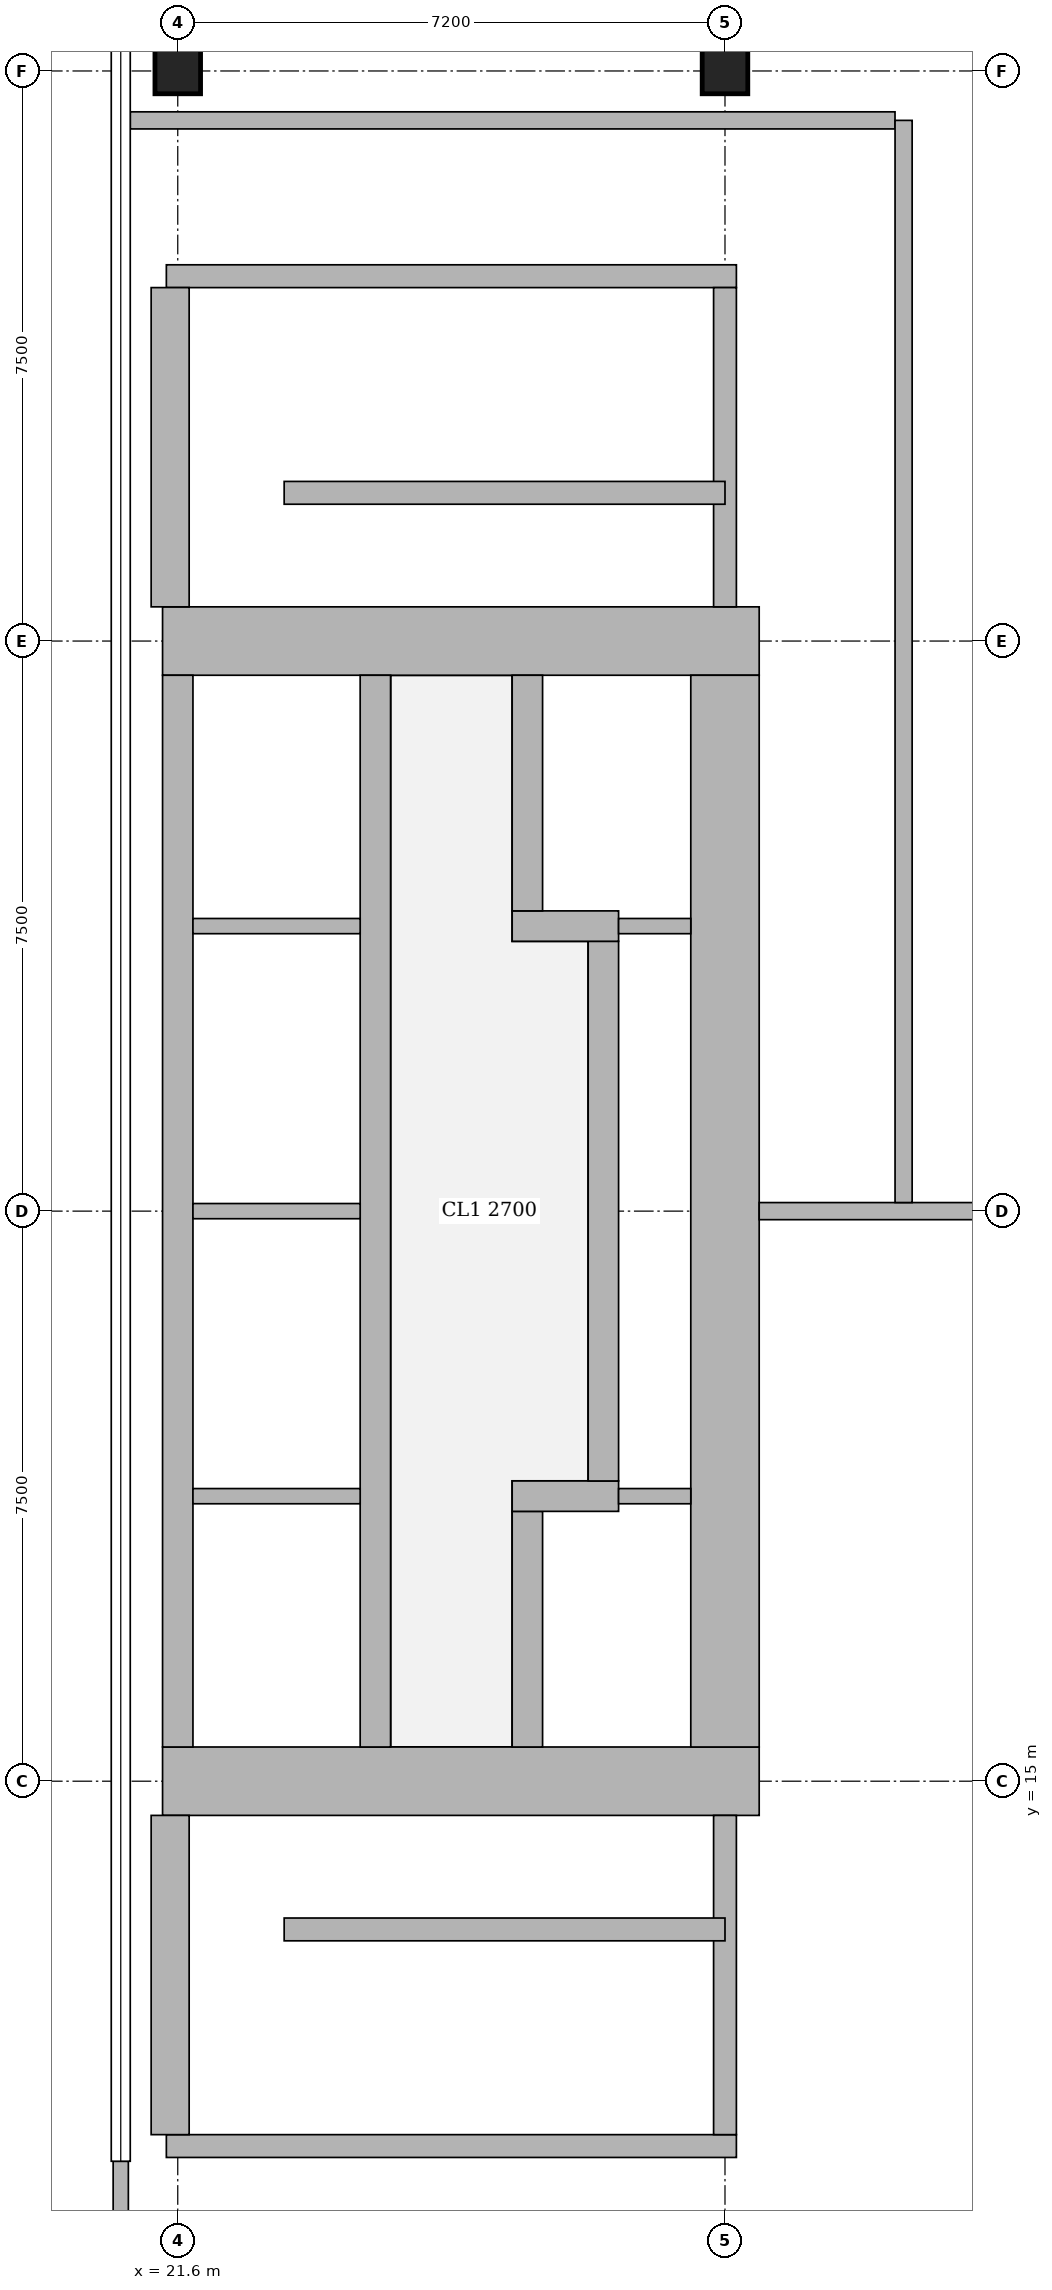
"""IFC4 building model, lengths in metres.
Left out: names, types, materials, properties, quantities, classifications, styles, units other than length and angle.
Written with IfcOpenShell. Run it as: python <this file> out.ifc"""

import sys

from ifc_helpers import new_model, si_unit, direction, frame, frame_2d, origin, origin_2d, place, context, subcontext, project, spatial, rectangle, extrude, element, fill, save


model = new_model("IFC4")
c1 = context("Model", 3, precision=1e-05, world=origin(), true_north=direction((0.0, 1.0)))
c2 = subcontext(c1, "Body", "Model", "MODEL_VIEW")
j1 = project(units=[si_unit("LENGTHUNIT", "METRE"), si_unit("PLANEANGLEUNIT", "RADIAN")], contexts=[c1])
p1 = place(None, origin())
s1 = spatial("IfcSite", under=j1, at=p1, CompositionType="ELEMENT")
p2 = place(p1, origin())
s2 = spatial("IfcBuilding", under=s1, at=p2, CompositionType="ELEMENT")
p3 = place(p2, frame((0.0, 0.0, 296.6)))
s3 = spatial("IfcBuildingStorey", under=s2, at=p3, CompositionType="ELEMENT", Elevation=296.6)
for number, where, z_axis, x_axis in (
    (1, (21.6, 37.5, 0.0), (0.0, 0.0, 1.0), (1.0, 0.0, 0.0)),
    (2, (28.8, 37.5, 0.0), (0.0, 0.0, 1.0), (1.0, 0.0, 0.0)),
):
    element("IfcColumn", number, at=place(p3, frame(where, z_axis=z_axis, x_axis=x_axis)), inside=s3, PredefinedType="COLUMN", context=c2, shape_type="SweptSolid", body=[
        extrude(rectangle(XDim=0.6, YDim=0.6, at=origin_2d()), origin(), (0.0, 0.0, 1.0), 5.0),
    ])
p4 = place(p3, frame((21.4, 15.0, 0.0), z_axis=(0.0, 0.0, 1.0), x_axis=(1.0, 0.0, 0.0)))
e3 = element("IfcWall", 3, at=p4, inside=s3, PredefinedType="SHEAR", context=c2, shape_type="SweptSolid", body=[
    extrude(rectangle(XDim=7.85, YDim=0.9, at=frame_2d((3.925, 0.0))), origin(), (0.0, 0.0, 1.0), 5.0),
])
p5 = place(p4, frame((3.25, 0.0, 0.0)))
e4 = element("IfcOpeningElement", 4, at=p5, cuts=e3, PredefinedType="OPENING", context=c2, shape_type="SweptSolid", body=[
    extrude(rectangle(XDim=1.1, YDim=2.1, at=frame_2d((0.55, 1.05))), frame((0.0, 0.46, 0.0), z_axis=(0.0, -1.0, 0.0), x_axis=(1.0, 0.0, 0.0)), (0.0, 0.0, 1.0), 0.92),
])
p6 = place(p3, frame((21.4, 30.0, 0.0), z_axis=(0.0, 0.0, 1.0), x_axis=(1.0, 0.0, 0.0)))
e5 = element("IfcWall", 5, at=p6, inside=s3, PredefinedType="SHEAR", context=c2, shape_type="SweptSolid", body=[
    extrude(rectangle(XDim=7.85, YDim=0.9, at=frame_2d((3.925, 0.0))), origin(), (0.0, 0.0, 1.0), 5.0),
])
p7 = place(p6, frame((3.25, 0.0, 0.0)))
e6 = element("IfcOpeningElement", 6, at=p7, cuts=e5, PredefinedType="OPENING", context=c2, shape_type="SweptSolid", body=[
    extrude(rectangle(XDim=1.1, YDim=2.1, at=frame_2d((0.55, 1.05))), frame((0.0, 0.46, 0.0), z_axis=(0.0, -1.0, 0.0), x_axis=(1.0, 0.0, 0.0)), (0.0, 0.0, 1.0), 0.92),
])
p8 = place(p3, frame((28.8, 15.45, 0.0), z_axis=(0.0, 0.0, 1.0), x_axis=(0.0, 1.0, 0.0)))
e7 = element("IfcWall", 7, at=p8, inside=s3, PredefinedType="SHEAR", context=c2, shape_type="SweptSolid", body=[
    extrude(rectangle(XDim=14.1, YDim=0.9, at=frame_2d((7.05, 0.0))), origin(), (0.0, 0.0, 1.0), 5.0),
])
for number, where, z_axis, x_axis in (
    (8, (21.6, 15.45, 0.0), (0.0, 0.0, 1.0), (0.0, 1.0, 0.0)),
    (9, (24.2, 15.45, 0.0), (0.0, 0.0, 1.0), (0.0, 1.0, 0.0)),
):
    element("IfcWall", number, at=place(p3, frame(where, z_axis=z_axis, x_axis=x_axis)), inside=s3, PredefinedType="SHEAR", context=c2, shape_type="SweptSolid", body=[
        extrude(rectangle(XDim=14.1, YDim=0.4, at=frame_2d((7.05, 0.0))), origin(), (0.0, 0.0, 1.0), 5.0),
    ])
p9 = place(p3, frame((26.2, 15.45, 0.0), z_axis=(0.0, 0.0, 1.0), x_axis=(0.0, 1.0, 0.0)))
e10 = element("IfcWall", 10, at=p9, inside=s3, PredefinedType="SHEAR", context=c2, shape_type="SweptSolid", body=[
    extrude(rectangle(XDim=3.1, YDim=0.4, at=frame_2d((1.55, 0.0))), origin(), (0.0, 0.0, 1.0), 5.0),
])
p10 = place(p9, frame((0.825, 0.0, 0.0)))
e11 = element("IfcOpeningElement", 11, at=p10, cuts=e10, PredefinedType="OPENING", context=c2, shape_type="SweptSolid", body=[
    extrude(rectangle(XDim=1.2, YDim=2.1, at=frame_2d((0.6, 1.05))), frame((0.0, 0.21, 0.0), z_axis=(0.0, -1.0, 0.0), x_axis=(1.0, 0.0, 0.0)), (0.0, 0.0, 1.0), 0.42),
])
p11 = place(p3, frame((26.0, 18.75, 0.0), z_axis=(0.0, 0.0, 1.0), x_axis=(1.0, 0.0, 0.0)))
e12 = element("IfcWall", 12, at=p11, inside=s3, PredefinedType="SHEAR", context=c2, shape_type="SweptSolid", body=[
    extrude(rectangle(XDim=1.4, YDim=0.4, at=frame_2d((0.7, 0.0))), origin(), (0.0, 0.0, 1.0), 5.0),
])
p12 = place(p3, frame((27.2, 18.95, 0.0), z_axis=(0.0, 0.0, 1.0), x_axis=(0.0, 1.0, 0.0)))
e13 = element("IfcWall", 13, at=p12, inside=s3, PredefinedType="SHEAR", context=c2, shape_type="SweptSolid", body=[
    extrude(rectangle(XDim=7.1, YDim=0.4, at=frame_2d((3.55, 0.0))), origin(), (0.0, 0.0, 1.0), 5.0),
])
p13 = place(p3, frame((26.0, 26.25, 0.0), z_axis=(0.0, 0.0, 1.0), x_axis=(1.0, 0.0, 0.0)))
e14 = element("IfcWall", 14, at=p13, inside=s3, PredefinedType="SHEAR", context=c2, shape_type="SweptSolid", body=[
    extrude(rectangle(XDim=1.4, YDim=0.4, at=frame_2d((0.7, 0.0))), origin(), (0.0, 0.0, 1.0), 5.0),
])
p14 = place(p3, frame((26.2, 26.45, 0.0), z_axis=(0.0, 0.0, 1.0), x_axis=(0.0, 1.0, 0.0)))
e15 = element("IfcWall", 15, at=p14, inside=s3, PredefinedType="SHEAR", context=c2, shape_type="SweptSolid", body=[
    extrude(rectangle(XDim=3.1, YDim=0.4, at=frame_2d((1.55, 0.0))), origin(), (0.0, 0.0, 1.0), 5.0),
])
p15 = place(p14, frame((1.075, 0.0, 0.0)))
e16 = element("IfcOpeningElement", 16, at=p15, cuts=e15, PredefinedType="OPENING", context=c2, shape_type="SweptSolid", body=[
    extrude(rectangle(XDim=1.2, YDim=2.1, at=frame_2d((0.6, 1.05))), frame((0.0, 0.21, 0.0), z_axis=(0.0, -1.0, 0.0), x_axis=(1.0, 0.0, 0.0)), (0.0, 0.0, 1.0), 0.42),
])
p16 = place(p3, frame((21.45, 10.2, 0.0), z_axis=(0.0, 0.0, 1.0), x_axis=(1.0, 0.0, 0.0)))
e17 = element("IfcWall", 17, at=p16, inside=s3, PredefinedType="SHEAR", context=c2, shape_type="SweptSolid", body=[
    extrude(rectangle(XDim=7.5, YDim=0.3, at=frame_2d((3.75, 0.0))), origin(), (0.0, 0.0, 1.0), 5.0),
])
p17 = place(p16, frame((0.5, 0.0, 0.0)))
e18 = element("IfcOpeningElement", 18, at=p17, cuts=e17, PredefinedType="OPENING", context=c2, shape_type="SweptSolid", body=[
    extrude(rectangle(XDim=1.1, YDim=2.1, at=frame_2d((0.55, 1.05))), frame((0.0, 0.16, 0.0), z_axis=(0.0, -1.0, 0.0), x_axis=(1.0, 0.0, 0.0)), (0.0, 0.0, 1.0), 0.32),
])
p18 = place(p3, frame((21.5, 10.35, 0.0), z_axis=(0.0, 0.0, 1.0), x_axis=(0.0, 1.0, 0.0)))
e19 = element("IfcWall", 19, at=p18, inside=s3, PredefinedType="SHEAR", context=c2, shape_type="SweptSolid", body=[
    extrude(rectangle(XDim=4.2, YDim=0.5, at=frame_2d((2.1, 0.0))), origin(), (0.0, 0.0, 1.0), 5.0),
])
p19 = place(p3, frame((28.8, 10.35, 0.0), z_axis=(0.0, 0.0, 1.0), x_axis=(0.0, 1.0, 0.0)))
e20 = element("IfcWall", 20, at=p19, inside=s3, PredefinedType="SHEAR", context=c2, shape_type="SweptSolid", body=[
    extrude(rectangle(XDim=4.2, YDim=0.3, at=frame_2d((2.1, 0.0))), origin(), (0.0, 0.0, 1.0), 5.0),
])
p20 = place(p3, frame((21.45, 34.8, 0.0), z_axis=(0.0, 0.0, 1.0), x_axis=(1.0, 0.0, 0.0)))
e21 = element("IfcWall", 21, at=p20, inside=s3, PredefinedType="SHEAR", context=c2, shape_type="SweptSolid", body=[
    extrude(rectangle(XDim=7.5, YDim=0.3, at=frame_2d((3.75, 0.0))), origin(), (0.0, 0.0, 1.0), 5.0),
])
p21 = place(p20, frame((0.5, 0.0, 0.0)))
e22 = element("IfcOpeningElement", 22, at=p21, cuts=e21, PredefinedType="OPENING", context=c2, shape_type="SweptSolid", body=[
    extrude(rectangle(XDim=1.1, YDim=2.1, at=frame_2d((0.55, 1.05))), frame((0.0, 0.16, 0.0), z_axis=(0.0, -1.0, 0.0), x_axis=(1.0, 0.0, 0.0)), (0.0, 0.0, 1.0), 0.32),
])
p22 = place(p3, frame((21.5, 30.45, 0.0), z_axis=(0.0, 0.0, 1.0), x_axis=(0.0, 1.0, 0.0)))
e23 = element("IfcWall", 23, at=p22, inside=s3, PredefinedType="SHEAR", context=c2, shape_type="SweptSolid", body=[
    extrude(rectangle(XDim=4.2, YDim=0.5, at=frame_2d((2.1, 0.0))), origin(), (0.0, 0.0, 1.0), 5.0),
])
p23 = place(p3, frame((28.8, 30.45, 0.0), z_axis=(0.0, 0.0, 1.0), x_axis=(0.0, 1.0, 0.0)))
e24 = element("IfcWall", 24, at=p23, inside=s3, PredefinedType="SHEAR", context=c2, shape_type="SweptSolid", body=[
    extrude(rectangle(XDim=4.2, YDim=0.3, at=frame_2d((2.1, 0.0))), origin(), (0.0, 0.0, 1.0), 5.0),
])
p24 = place(p3, frame((20.85, 10.0, 0.0), z_axis=(0.0, 0.0, 1.0), x_axis=(0.0, -1.0, 0.0)))
e25 = element("IfcWall", 25, at=p24, inside=s3, PredefinedType="SOLIDWALL", context=c2, shape_type="SweptSolid", body=[
    extrude(rectangle(XDim=2.337, YDim=0.2, at=frame_2d((1.168, 0.0))), origin(), (0.0, 0.0, 1.0), 4.65),
])
p25 = place(p24, frame((0.5, 0.0, 0.0)))
e26 = element("IfcOpeningElement", 26, at=p25, cuts=e25, PredefinedType="OPENING", context=c2, shape_type="SweptSolid", body=[
    extrude(rectangle(XDim=1.0, YDim=2.4, at=frame_2d((0.5, 1.2))), frame((0.0, 0.11, 0.0), z_axis=(0.0, -1.0, 0.0), x_axis=(1.0, 0.0, 0.0)), (0.0, 0.0, 1.0), 0.22),
])
p26 = place(p3, frame((29.25, 22.5, 0.0), z_axis=(0.0, 0.0, 1.0), x_axis=(1.0, 0.0, 0.0)))
e27 = element("IfcWall", 27, at=p26, inside=s3, PredefinedType="SOLIDWALL", context=c2, shape_type="SweptSolid", body=[
    extrude(rectangle(XDim=3.449, YDim=0.225, at=frame_2d((1.725, 0.0))), origin(), (0.0, 0.0, 1.0), 4.65),
])
p27 = place(p26, origin())
e28 = element("IfcOpeningElement", 28, at=p27, cuts=e27, PredefinedType="OPENING", context=c2, shape_type="SweptSolid", body=[
    extrude(rectangle(XDim=1.8, YDim=2.4, at=frame_2d((0.9, 1.2))), frame((0.0, 0.123, 0.0), z_axis=(0.0, -1.0, 0.0), x_axis=(1.0, 0.0, 0.0)), (0.0, 0.0, 1.0), 0.245),
])
p28 = place(p3, frame((20.975, 36.85, 0.0), z_axis=(0.0, 0.0, 1.0), x_axis=(1.0, 0.0, 0.0)))
e29 = element("IfcWall", 29, at=p28, inside=s3, PredefinedType="SOLIDWALL", context=c2, shape_type="SweptSolid", body=[
    extrude(rectangle(XDim=10.062, YDim=0.225, at=frame_2d((5.031, 0.0))), origin(), (0.0, 0.0, 1.0), 4.65),
])
p29 = place(p28, frame((4.375, 0.0, 0.0)))
e30 = element("IfcOpeningElement", 30, at=p29, cuts=e29, PredefinedType="OPENING", context=c2, shape_type="SweptSolid", body=[
    extrude(rectangle(XDim=1.8, YDim=2.4, at=frame_2d((0.9, 1.2))), frame((0.0, 0.123, 0.0), z_axis=(0.0, -1.0, 0.0), x_axis=(1.0, 0.0, 0.0)), (0.0, 0.0, 1.0), 0.245),
])
p30 = place(p3, frame((31.15, 22.613, 0.0), z_axis=(0.0, 0.0, 1.0), x_axis=(0.0, 1.0, 0.0)))
e31 = element("IfcWall", 31, at=p30, inside=s3, PredefinedType="SOLIDWALL", context=c2, shape_type="SweptSolid", body=[
    extrude(rectangle(XDim=14.237, YDim=0.225, at=frame_2d((7.119, 0.0))), origin(), (0.0, 0.0, 1.0), 4.65),
])
p31 = place(p30, frame((3.987, 0.0, 0.0)))
e32 = element("IfcOpeningElement", 32, at=p31, cuts=e31, PredefinedType="OPENING", context=c2, shape_type="SweptSolid", body=[
    extrude(rectangle(XDim=1.8, YDim=2.4, at=frame_2d((0.9, 1.2))), frame((0.0, 0.123, 0.0), z_axis=(0.0, -1.0, 0.0), x_axis=(1.0, 0.0, 0.0)), (0.0, 0.0, 1.0), 0.245),
])
for number, where, z_axis, x_axis in (
    (33, (23.0, 13.05, 0.0), (0.0, 0.0, 1.0), (1.0, 0.0, 0.0)),
    (34, (23.0, 31.95, 0.0), (0.0, 0.0, 1.0), (1.0, 0.0, 0.0)),
):
    element("IfcWall", number, at=place(p3, frame(where, z_axis=z_axis, x_axis=x_axis)), inside=s3, PredefinedType="SHEAR", context=c2, shape_type="SweptSolid", body=[
        extrude(rectangle(XDim=5.8, YDim=0.3, at=frame_2d((2.9, 0.0))), origin(), (0.0, 0.0, 1.0), 5.0),
    ])
for number, where, z_axis, x_axis in (
    (35, (21.8, 18.75, 0.0), (0.0, 0.0, 1.0), (1.0, 0.0, 0.0)),
    (36, (21.8, 22.5, 0.0), (0.0, 0.0, 1.0), (1.0, 0.0, 0.0)),
    (37, (21.8, 26.25, 0.0), (0.0, 0.0, 1.0), (1.0, 0.0, 0.0)),
):
    element("IfcWall", number, at=place(p3, frame(where, z_axis=z_axis, x_axis=x_axis)), inside=s3, PredefinedType="SOLIDWALL", context=c2, shape_type="SweptSolid", body=[
        extrude(rectangle(XDim=2.2, YDim=0.2, at=frame_2d((1.1, 0.0))), origin(), (0.0, 0.0, 1.0), 4.65),
    ])
for number, where, z_axis, x_axis in (
    (38, (27.4, 18.75, 0.0), (0.0, 0.0, 1.0), (1.0, 0.0, 0.0)),
    (39, (27.4, 26.25, 0.0), (0.0, 0.0, 1.0), (1.0, 0.0, 0.0)),
):
    element("IfcWall", number, at=place(p3, frame(where, z_axis=z_axis, x_axis=x_axis)), inside=s3, PredefinedType="SOLIDWALL", context=c2, shape_type="SweptSolid", body=[
        extrude(rectangle(XDim=0.95, YDim=0.2, at=frame_2d((0.475, 0.0))), origin(), (0.0, 0.0, 1.0), 4.65),
    ])
p32 = place(p25, origin())
e40 = element("IfcDoor", 40, at=p32, inside=s3, OperationType="SINGLE_SWING_RIGHT", PredefinedType="DOOR", context=c2, shape_type="SweptSolid", body=[
    extrude(rectangle(XDim=1.0, YDim=2.4, at=frame_2d((0.5, 1.2))), frame((0.0, 0.025, 0.0), z_axis=(0.0, -1.0, 0.0), x_axis=(1.0, 0.0, 0.0)), (0.0, 0.0, 1.0), 0.05),
])
fill(e26, e40)
p33 = place(p27, origin())
e41 = element("IfcDoor", 41, at=p33, inside=s3, OperationType="DOUBLE_DOOR_SINGLE_SWING", PredefinedType="DOOR", context=c2, shape_type="SweptSolid", body=[
    extrude(rectangle(XDim=1.8, YDim=2.4, at=frame_2d((0.9, 1.2))), frame((0.0, 0.025, 0.0), z_axis=(0.0, -1.0, 0.0), x_axis=(1.0, 0.0, 0.0)), (0.0, 0.0, 1.0), 0.05),
])
fill(e28, e41)
p34 = place(p31, origin())
e42 = element("IfcDoor", 42, at=p34, inside=s3, OperationType="DOUBLE_DOOR_SINGLE_SWING", PredefinedType="DOOR", context=c2, shape_type="SweptSolid", body=[
    extrude(rectangle(XDim=1.8, YDim=2.4, at=frame_2d((0.9, 1.2))), frame((0.0, 0.025, 0.0), z_axis=(0.0, -1.0, 0.0), x_axis=(1.0, 0.0, 0.0)), (0.0, 0.0, 1.0), 0.05),
])
fill(e32, e42)
p35 = place(p29, origin())
e43 = element("IfcDoor", 43, at=p35, inside=s3, OperationType="DOUBLE_DOOR_SINGLE_SWING", PredefinedType="DOOR", context=c2, shape_type="SweptSolid", body=[
    extrude(rectangle(XDim=1.8, YDim=2.4, at=frame_2d((0.9, 1.2))), frame((0.0, 0.025, 0.0), z_axis=(0.0, -1.0, 0.0), x_axis=(1.0, 0.0, 0.0)), (0.0, 0.0, 1.0), 0.05),
])
fill(e30, e43)
p36 = place(p5, origin())
e44 = element("IfcDoor", 44, at=p36, inside=s3, OperationType="SINGLE_SWING_RIGHT", PredefinedType="DOOR", context=c2, shape_type="SweptSolid", body=[
    extrude(rectangle(XDim=1.1, YDim=2.1, at=frame_2d((0.55, 1.05))), frame((0.0, 0.025, 0.0), z_axis=(0.0, -1.0, 0.0), x_axis=(1.0, 0.0, 0.0)), (0.0, 0.0, 1.0), 0.05),
])
fill(e4, e44)
p37 = place(p7, origin())
e45 = element("IfcDoor", 45, at=p37, inside=s3, OperationType="SINGLE_SWING_RIGHT", PredefinedType="DOOR", context=c2, shape_type="SweptSolid", body=[
    extrude(rectangle(XDim=1.1, YDim=2.1, at=frame_2d((0.55, 1.05))), frame((0.0, 0.025, 0.0), z_axis=(0.0, -1.0, 0.0), x_axis=(1.0, 0.0, 0.0)), (0.0, 0.0, 1.0), 0.05),
])
fill(e6, e45)
p38 = place(p10, origin())
e46 = element("IfcDoor", 46, at=p38, inside=s3, OperationType="DOUBLE_DOOR_SLIDING", PredefinedType="DOOR", context=c2, shape_type="SweptSolid", body=[
    extrude(rectangle(XDim=1.2, YDim=2.1, at=frame_2d((0.6, 1.05))), frame((0.0, 0.025, 0.0), z_axis=(0.0, -1.0, 0.0), x_axis=(1.0, 0.0, 0.0)), (0.0, 0.0, 1.0), 0.05),
])
fill(e11, e46)
p39 = place(p15, origin())
e47 = element("IfcDoor", 47, at=p39, inside=s3, OperationType="DOUBLE_DOOR_SLIDING", PredefinedType="DOOR", context=c2, shape_type="SweptSolid", body=[
    extrude(rectangle(XDim=1.2, YDim=2.1, at=frame_2d((0.6, 1.05))), frame((0.0, 0.025, 0.0), z_axis=(0.0, -1.0, 0.0), x_axis=(1.0, 0.0, 0.0)), (0.0, 0.0, 1.0), 0.05),
])
fill(e16, e47)
p40 = place(p17, origin())
e48 = element("IfcDoor", 48, at=p40, inside=s3, OperationType="SINGLE_SWING_LEFT", PredefinedType="DOOR", context=c2, shape_type="SweptSolid", body=[
    extrude(rectangle(XDim=1.1, YDim=2.1, at=frame_2d((0.55, 1.05))), frame((0.0, 0.025, 0.0), z_axis=(0.0, -1.0, 0.0), x_axis=(1.0, 0.0, 0.0)), (0.0, 0.0, 1.0), 0.05),
])
fill(e18, e48)
p41 = place(p21, origin())
e49 = element("IfcDoor", 49, at=p41, inside=s3, OperationType="SINGLE_SWING_RIGHT", PredefinedType="DOOR", context=c2, shape_type="SweptSolid", body=[
    extrude(rectangle(XDim=1.1, YDim=2.1, at=frame_2d((0.55, 1.05))), frame((0.0, 0.025, 0.0), z_axis=(0.0, -1.0, 0.0), x_axis=(1.0, 0.0, 0.0)), (0.0, 0.0, 1.0), 0.05),
])
fill(e22, e49)
save(model, sys.argv[1])
